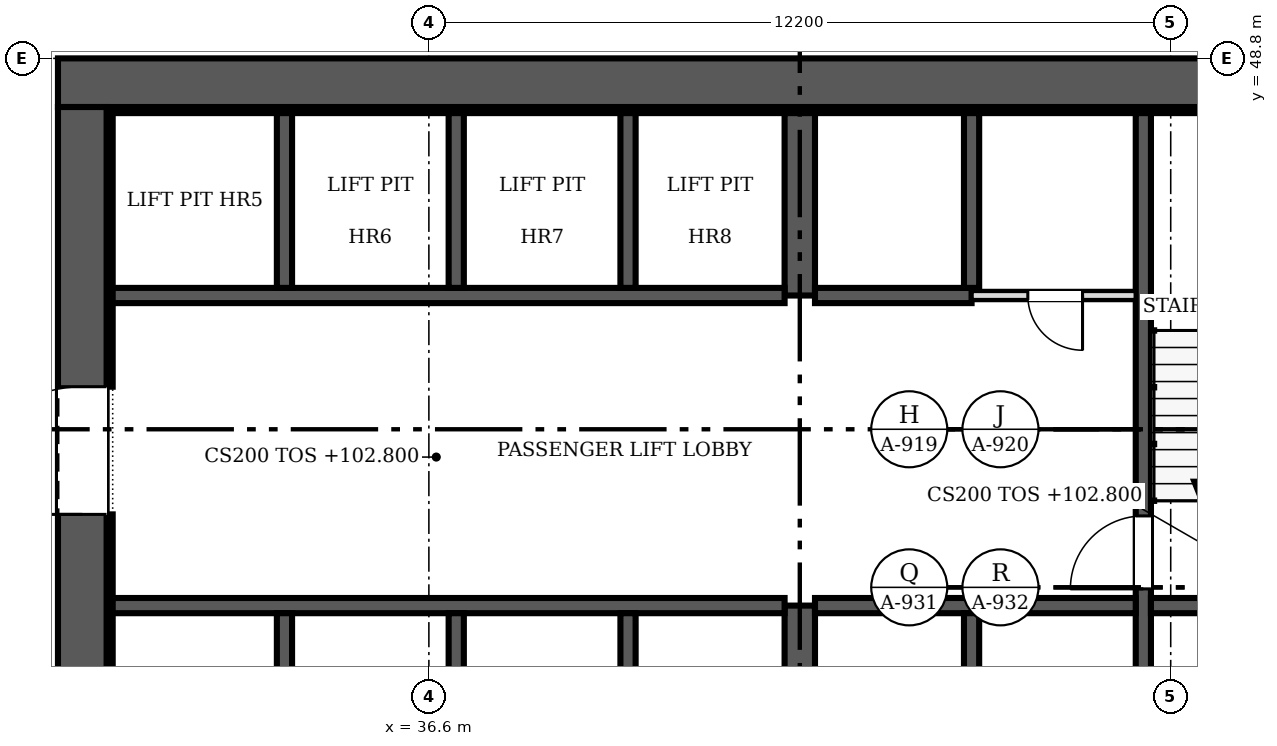
"""IFC4 building model, lengths in metres.
Left out: names, types, materials, properties, quantities, classifications, styles, units other than length and angle.
Written with IfcOpenShell. Run it as: python <this file> out.ifc"""

import sys

from ifc_helpers import new_model, si_unit, direction, frame, frame_2d, origin, place, context, subcontext, project, spatial, rectangle, extrude, source, transform, mapped, element, fill, save


model = new_model("IFC4")
c1 = context("Model", 3, precision=1e-05, world=origin(), true_north=direction((0.0, 1.0)))
c2 = subcontext(c1, "Body", "Model", "MODEL_VIEW")
j1 = project(units=[si_unit("LENGTHUNIT", "METRE"), si_unit("PLANEANGLEUNIT", "RADIAN")], contexts=[c1])
p1 = place(None, origin())
s1 = spatial("IfcSite", under=j1, at=p1, CompositionType="ELEMENT")
p2 = place(p1, origin())
s2 = spatial("IfcBuilding", under=s1, at=p2, CompositionType="ELEMENT")
p3 = place(p2, frame((0.0, 0.0, 102.8)))
s3 = spatial("IfcBuildingStorey", under=s2, at=p3, CompositionType="ELEMENT", Elevation=102.8)
p4 = place(p3, frame((30.9, 25.2, 0.0), z_axis=(0.0, 0.0, 1.0), x_axis=(0.0, 1.0, 0.0)))
e1 = element("IfcWall", 1, at=p4, inside=s3, PredefinedType="SHEAR", context=c2, shape_type="SweptSolid", body=[
    extrude(rectangle(XDim=22.8, YDim=0.8, at=frame_2d((11.4, 0.0))), origin(), (0.0, 0.0, 1.0), 3.8),
])
m1 = source(origin(), c2, "Body", "SweptSolid", [
    extrude(rectangle(XDim=2.1, YDim=2.4, at=frame_2d((1.05, 1.2))), frame((0.0, 0.41, 0.0), z_axis=(0.0, -1.0, 0.0), x_axis=(1.0, 0.0, 0.0)), (0.0, 0.0, 1.0), 0.82),
])
p5 = place(p4, frame((4.6, 0.0, 0.0)))
e2 = element("IfcOpeningElement", 2, at=p5, cuts=e1, PredefinedType="OPENING", context=c2, shape_type="MappedRepresentation", body=[
    mapped(m1, transform((0.0, 0.0, 0.0), scale=1.0)),
])
p6 = place(p4, frame((16.1, 0.0, 0.0)))
e3 = element("IfcOpeningElement", 3, at=p6, cuts=e1, PredefinedType="OPENING", context=c2, shape_type="MappedRepresentation", body=[
    mapped(m1, transform((0.0, 0.0, 0.0), scale=1.0)),
])
p7 = place(p3, frame((30.5, 48.4, 0.0), z_axis=(0.0, 0.0, 1.0), x_axis=(1.0, 0.0, 0.0)))
e4 = element("IfcWall", 4, at=p7, inside=s3, PredefinedType="SHEAR", context=c2, shape_type="SweptSolid", body=[
    extrude(rectangle(XDim=24.4, YDim=0.8, at=frame_2d((12.2, 0.0))), origin(), (0.0, 0.0, 1.0), 3.8),
])
p8 = place(p3, frame((31.3, 47.95, 0.0), z_axis=(0.0, 0.0, 1.0), x_axis=(1.0, 0.0, 0.0)))
e5 = element("IfcWall", 5, at=p8, inside=s3, PredefinedType="SOLIDWALL", context=c2, shape_type="SweptSolid", body=[
    extrude(rectangle(XDim=22.8, YDim=0.1, at=frame_2d((11.4, 0.0))), origin(), (0.0, 0.0, 1.0), 3.8),
])
p9 = place(p3, frame((31.35, 31.9, 0.0), z_axis=(0.0, 0.0, 1.0), x_axis=(0.0, 1.0, 0.0)))
e6 = element("IfcWall", 6, at=p9, inside=s3, PredefinedType="SOLIDWALL", context=c2, shape_type="SweptSolid", body=[
    extrude(rectangle(XDim=9.4, YDim=0.1, at=frame_2d((4.7, 0.0))), origin(), (0.0, 0.0, 1.0), 3.8),
])
p10 = place(p3, frame((31.35, 43.4, 0.0), z_axis=(0.0, 0.0, 1.0), x_axis=(0.0, 1.0, 0.0)))
e7 = element("IfcWall", 7, at=p10, inside=s3, PredefinedType="SOLIDWALL", context=c2, shape_type="SweptSolid", body=[
    extrude(rectangle(XDim=4.5, YDim=0.1, at=frame_2d((2.25, 0.0))), origin(), (0.0, 0.0, 1.0), 3.8),
])
p11 = place(p3, frame((42.7, 36.85, 0.0), z_axis=(0.0, 0.0, 1.0), x_axis=(0.0, 1.0, 0.0)))
e8 = element("IfcWall", 8, at=p11, inside=s3, PredefinedType="SHEAR", context=c2, shape_type="SweptSolid", body=[
    extrude(rectangle(XDim=2.95, YDim=0.5, at=frame_2d((1.475, 0.0))), origin(), (0.0, 0.0, 1.0), 3.8),
])
p12 = place(p3, frame((42.7, 44.9, 0.0), z_axis=(0.0, 0.0, 1.0), x_axis=(0.0, 1.0, 0.0)))
e9 = element("IfcWall", 9, at=p12, inside=s3, PredefinedType="SHEAR", context=c2, shape_type="SweptSolid", body=[
    extrude(rectangle(XDim=3.0, YDim=0.5, at=frame_2d((1.5, 0.0))), origin(), (0.0, 0.0, 1.0), 3.8),
])
p13 = place(p3, frame((48.35, 47.9, 0.0), z_axis=(0.0, 0.0, 1.0), x_axis=(0.0, -1.0, 0.0)))
e10 = element("IfcWall", 10, at=p13, inside=s3, PredefinedType="SOLIDWALL", context=c2, shape_type="SweptSolid", body=[
    extrude(rectangle(XDim=11.05, YDim=0.25, at=frame_2d((5.525, 0.0))), origin(), (0.0, 0.0, 1.0), 3.8),
])
m2 = source(origin(), c2, "Body", "SweptSolid", [
    extrude(rectangle(XDim=1.2, YDim=2.1, at=frame_2d((0.6, 1.05))), frame((0.0, 0.135, 0.0), z_axis=(0.0, -1.0, 0.0), x_axis=(1.0, 0.0, 0.0)), (0.0, 0.0, 1.0), 0.27),
])
p14 = place(p13, frame((6.625, 0.0, 0.0)))
e11 = element("IfcOpeningElement", 11, at=p14, cuts=e10, PredefinedType="OPENING", context=c2, shape_type="MappedRepresentation", body=[
    mapped(m2, transform((0.0, 0.0, 0.0), scale=1.0)),
])
p15 = place(p3, frame((31.4, 39.8, 0.0), z_axis=(0.0, 0.0, 1.0), x_axis=(1.0, 0.0, 0.0)))
e12 = element("IfcWall", 12, at=p15, inside=s3, PredefinedType="SOLIDWALL", context=c2, shape_type="SweptSolid", body=[
    extrude(rectangle(XDim=11.05, YDim=0.25, at=frame_2d((5.525, 0.0))), origin(), (0.0, 0.0, 1.0), 3.8),
])
p16 = place(p3, frame((42.95, 39.8, 0.0), z_axis=(0.0, 0.0, 1.0), x_axis=(1.0, 0.0, 0.0)))
e13 = element("IfcWall", 13, at=p16, inside=s3, PredefinedType="SOLIDWALL", context=c2, shape_type="SweptSolid", body=[
    extrude(rectangle(XDim=5.275, YDim=0.25, at=frame_2d((2.638, 0.0))), origin(), (0.0, 0.0, 1.0), 3.8),
])
p17 = place(p3, frame((48.475, 39.8, 0.0), z_axis=(0.0, 0.0, 1.0), x_axis=(1.0, 0.0, 0.0)))
e14 = element("IfcWall", 14, at=p17, inside=s3, PredefinedType="SOLIDWALL", context=c2, shape_type="SweptSolid", body=[
    extrude(rectangle(XDim=3.525, YDim=0.25, at=frame_2d((1.762, 0.0))), origin(), (0.0, 0.0, 1.0), 3.8),
])
p18 = place(p3, frame((31.4, 44.9, 0.0), z_axis=(0.0, 0.0, 1.0), x_axis=(1.0, 0.0, 0.0)))
e15 = element("IfcWall", 15, at=p18, inside=s3, PredefinedType="SOLIDWALL", context=c2, shape_type="SweptSolid", body=[
    extrude(rectangle(XDim=11.05, YDim=0.25, at=frame_2d((5.525, 0.0))), origin(), (0.0, 0.0, 1.0), 3.8),
])
p19 = place(p3, frame((42.95, 44.9, 0.0), z_axis=(0.0, 0.0, 1.0), x_axis=(1.0, 0.0, 0.0)))
e16 = element("IfcWall", 16, at=p19, inside=s3, PredefinedType="SOLIDWALL", context=c2, shape_type="SweptSolid", body=[
    extrude(rectangle(XDim=2.575, YDim=0.25, at=frame_2d((1.288, 0.0))), origin(), (0.0, 0.0, 1.0), 3.8),
])
for number, where, z_axis, x_axis in (
    (17, (34.225, 36.85, 0.0), (0.0, 0.0, 1.0), (0.0, 1.0, 0.0)),
    (18, (37.05, 36.85, 0.0), (0.0, 0.0, 1.0), (0.0, 1.0, 0.0)),
    (19, (39.875, 36.85, 0.0), (0.0, 0.0, 1.0), (0.0, 1.0, 0.0)),
    (20, (45.525, 36.85, 0.0), (0.0, 0.0, 1.0), (0.0, 1.0, 0.0)),
):
    element("IfcWall", number, at=place(p3, frame(where, z_axis=z_axis, x_axis=x_axis)), inside=s3, PredefinedType="SOLIDWALL", context=c2, shape_type="SweptSolid", body=[
        extrude(rectangle(XDim=2.825, YDim=0.25, at=frame_2d((1.413, 0.0))), origin(), (0.0, 0.0, 1.0), 3.8),
    ])
for number, where, z_axis, x_axis in (
    (21, (34.225, 45.025, 0.0), (0.0, 0.0, 1.0), (0.0, 1.0, 0.0)),
    (22, (37.05, 45.025, 0.0), (0.0, 0.0, 1.0), (0.0, 1.0, 0.0)),
    (23, (39.875, 45.025, 0.0), (0.0, 0.0, 1.0), (0.0, 1.0, 0.0)),
    (24, (45.525, 45.025, 0.0), (0.0, 0.0, 1.0), (0.0, 1.0, 0.0)),
):
    element("IfcWall", number, at=place(p3, frame(where, z_axis=z_axis, x_axis=x_axis)), inside=s3, PredefinedType="SOLIDWALL", context=c2, shape_type="SweptSolid", body=[
        extrude(rectangle(XDim=2.875, YDim=0.25, at=frame_2d((1.438, 0.0))), origin(), (0.0, 0.0, 1.0), 3.8),
    ])
p20 = place(p3, frame((45.525, 44.9, 0.0), z_axis=(0.0, 0.0, 1.0), x_axis=(1.0, 0.0, 0.0)))
e25 = element("IfcWall", 25, at=p20, inside=s3, PredefinedType="PARTITIONING", context=c2, shape_type="SweptSolid", body=[
    extrude(rectangle(XDim=2.7, YDim=0.15, at=frame_2d((1.35, 0.0))), origin(), (0.0, 0.0, 1.0), 3.55),
])
m3 = source(origin(), c2, "Body", "SweptSolid", [
    extrude(rectangle(XDim=0.9, YDim=2.1, at=frame_2d((0.45, 1.05))), frame((0.0, 0.085, 0.0), z_axis=(0.0, -1.0, 0.0), x_axis=(1.0, 0.0, 0.0)), (0.0, 0.0, 1.0), 0.17),
])
p21 = place(p20, frame((0.925, 0.0, 0.0)))
e26 = element("IfcOpeningElement", 26, at=p21, cuts=e25, PredefinedType="OPENING", context=c2, shape_type="MappedRepresentation", body=[
    mapped(m3, transform((0.0, 0.0, 0.0), scale=1.0)),
])
m4 = source(origin(), c2, "Body", "SweptSolid", [
    extrude(rectangle(XDim=2.1, YDim=2.4, at=frame_2d((1.05, 1.2))), frame((0.0, 0.025, 0.0), z_axis=(0.0, -1.0, 0.0), x_axis=(1.0, 0.0, 0.0)), (0.0, 0.0, 1.0), 0.05),
])
p22 = place(p6, origin())
e27 = element("IfcDoor", 27, at=p22, inside=s3, OperationType="DOUBLE_DOOR_SINGLE_SWING", PredefinedType="DOOR", context=c2, shape_type="MappedRepresentation", body=[
    mapped(m4, transform((0.0, 0.0, 0.0), scale=1.0)),
])
fill(e3, e27)
m5 = source(origin(), c2, "Body", "SweptSolid", [
    extrude(rectangle(XDim=1.2, YDim=2.1, at=frame_2d((0.6, 1.05))), frame((0.0, 0.025, 0.0), z_axis=(0.0, -1.0, 0.0), x_axis=(1.0, 0.0, 0.0)), (0.0, 0.0, 1.0), 0.05),
])
p23 = place(p14, origin())
e28 = element("IfcDoor", 28, at=p23, inside=s3, OperationType="SINGLE_SWING_RIGHT", PredefinedType="DOOR", context=c2, shape_type="MappedRepresentation", body=[
    mapped(m5, transform((0.0, 0.0, 0.0), scale=1.0)),
])
fill(e11, e28)
m6 = source(origin(), c2, "Body", "SweptSolid", [
    extrude(rectangle(XDim=0.9, YDim=2.1, at=frame_2d((0.45, 1.05))), frame((0.0, 0.025, 0.0), z_axis=(0.0, -1.0, 0.0), x_axis=(1.0, 0.0, 0.0)), (0.0, 0.0, 1.0), 0.05),
])
p24 = place(p21, origin())
e29 = element("IfcDoor", 29, at=p24, inside=s3, OperationType="SINGLE_SWING_RIGHT", PredefinedType="DOOR", context=c2, shape_type="MappedRepresentation", body=[
    mapped(m6, transform((0.0, 0.0, 0.0), scale=1.0)),
])
fill(e26, e29)
save(model, sys.argv[1])
